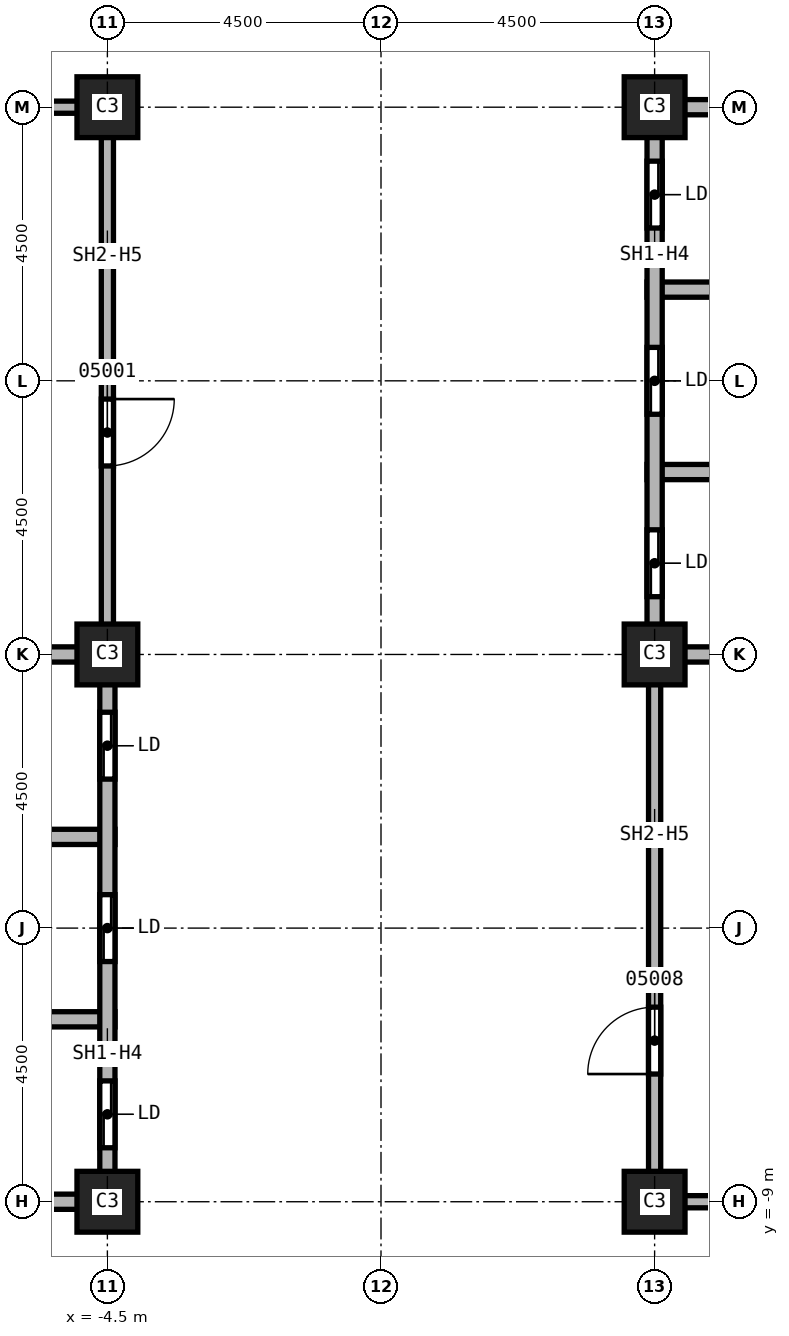
"""IFC4 building model, lengths in metres.
Left out: names, types, materials, properties, quantities, classifications, styles, units other than length and angle.
Written with IfcOpenShell. Run it as: python <this file> out.ifc"""

import sys

from ifc_helpers import new_model, si_unit, direction, frame, frame_2d, origin, origin_2d, place, context, subcontext, project, spatial, rectangle, extrude, element, fill, save


model = new_model("IFC4")
c1 = context("Model", 3, precision=1e-05, world=origin(), true_north=direction((0.0, 1.0)))
c2 = subcontext(c1, "Body", "Model", "MODEL_VIEW")
j1 = project(units=[si_unit("LENGTHUNIT", "METRE"), si_unit("PLANEANGLEUNIT", "RADIAN")], contexts=[c1])
p1 = place(None, origin())
s1 = spatial("IfcSite", under=j1, at=p1, CompositionType="ELEMENT")
p2 = place(p1, origin())
s2 = spatial("IfcBuilding", under=s1, at=p2, CompositionType="ELEMENT")
p3 = place(p2, frame((0.0, 0.0, 112.0)))
s3 = spatial("IfcBuildingStorey", under=s2, at=p3, CompositionType="ELEMENT", Elevation=112.0)
for number, where, z_axis, x_axis in (
    (1, (4.5, 0.0, 0.0), (0.0, 0.0, 1.0), (1.0, 0.0, 0.0)),
    (2, (4.5, 9.0, 0.0), (0.0, 0.0, 1.0), (1.0, 0.0, 0.0)),
    (3, (4.5, -9.0, 0.0), (0.0, 0.0, 1.0), (1.0, 0.0, 0.0)),
    (4, (-4.5, 0.0, 0.0), (0.0, 0.0, 1.0), (1.0, 0.0, 0.0)),
    (5, (-4.5, 9.0, 0.0), (0.0, 0.0, 1.0), (1.0, 0.0, 0.0)),
    (6, (-4.5, -9.0, 0.0), (0.0, 0.0, 1.0), (1.0, 0.0, 0.0)),
):
    element("IfcColumn", number, at=place(p3, frame(where, z_axis=z_axis, x_axis=x_axis)), inside=s3, PredefinedType="COLUMN", context=c2, shape_type="SweptSolid", body=[
        extrude(rectangle(XDim=1.0, YDim=1.0, at=origin_2d()), origin(), (0.0, 0.0, 1.0), 3.7),
    ])
p4 = place(p3, frame((-7.5, 9.0, 0.0), z_axis=(0.0, 0.0, 1.0), x_axis=(1.0, 0.0, 0.0)))
e7 = element("IfcWall", 7, at=p4, inside=s3, PredefinedType="SOLIDWALL", context=c2, shape_type="SweptSolid", body=[
    extrude(rectangle(XDim=3.0, YDim=0.2, at=frame_2d((1.5, 0.0))), origin(), (0.0, 0.0, 1.0), 2.938),
])
p5 = place(p3, frame((-4.5, 9.1, 0.0), z_axis=(0.0, 0.0, 1.0), x_axis=(0.0, -1.0, 0.0)))
e8 = element("IfcWall", 8, at=p5, inside=s3, PredefinedType="SOLIDWALL", context=c2, shape_type="SweptSolid", body=[
    extrude(rectangle(XDim=9.1, YDim=0.2, at=frame_2d((4.55, 0.0))), origin(), (0.0, 0.0, 1.0), 2.938),
])
p6 = place(p5, frame((4.9, 0.0, 0.0)))
e9 = element("IfcOpeningElement", 9, at=p6, cuts=e8, PredefinedType="OPENING", context=c2, shape_type="SweptSolid", body=[
    extrude(rectangle(XDim=1.1, YDim=2.1, at=frame_2d((0.55, 1.05))), frame((0.0, 0.1, 0.0), z_axis=(0.0, -1.0, 0.0), x_axis=(1.0, 0.0, 0.0)), (0.0, 0.0, 1.0), 0.2),
])
p7 = place(p3, frame((4.5, -9.1, 0.0), z_axis=(0.0, 0.0, 1.0), x_axis=(0.0, 1.0, 0.0)))
e10 = element("IfcWall", 10, at=p7, inside=s3, PredefinedType="SOLIDWALL", context=c2, shape_type="SweptSolid", body=[
    extrude(rectangle(XDim=9.1, YDim=0.2, at=frame_2d((4.55, 0.0))), origin(), (0.0, 0.0, 1.0), 2.938),
])
p8 = place(p7, frame((2.2, 0.0, 0.0)))
e11 = element("IfcOpeningElement", 11, at=p8, cuts=e10, PredefinedType="OPENING", context=c2, shape_type="SweptSolid", body=[
    extrude(rectangle(XDim=1.1, YDim=2.1, at=frame_2d((0.55, 1.05))), frame((0.0, 0.1, 0.0), z_axis=(0.0, -1.0, 0.0), x_axis=(1.0, 0.0, 0.0)), (0.0, 0.0, 1.0), 0.2),
])
p9 = place(p3, frame((7.5, -9.0, 0.0), z_axis=(0.0, 0.0, 1.0), x_axis=(-1.0, 0.0, 0.0)))
e12 = element("IfcWall", 12, at=p9, inside=s3, PredefinedType="SOLIDWALL", context=c2, shape_type="SweptSolid", body=[
    extrude(rectangle(XDim=3.0, YDim=0.2, at=frame_2d((1.5, 0.0))), origin(), (0.0, 0.0, 1.0), 2.938),
])
p10 = place(p3, frame((-13.625, -3.0, 0.0), z_axis=(0.0, 0.0, 1.0), x_axis=(1.0, 0.0, 0.0)))
e13 = element("IfcWall", 13, at=p10, inside=s3, PredefinedType="SOLIDWALL", context=c2, shape_type="SweptSolid", body=[
    extrude(rectangle(XDim=9.25, YDim=0.25, at=frame_2d((4.625, 0.0))), origin(), (0.0, 0.0, 1.0), 3.7),
])
p11 = place(p10, frame((3.25, 0.0, 0.0)))
e14 = element("IfcOpeningElement", 14, at=p11, cuts=e13, PredefinedType="OPENING", context=c2, shape_type="SweptSolid", body=[
    extrude(rectangle(XDim=1.1, YDim=2.1, at=frame_2d((0.55, 1.05))), frame((0.0, 0.125, 0.0), z_axis=(0.0, -1.0, 0.0), x_axis=(1.0, 0.0, 0.0)), (0.0, 0.0, 1.0), 0.25),
])
for number, where, z_axis, x_axis in (
    (15, (-7.625, -6.0, 0.0), (0.0, 0.0, 1.0), (1.0, 0.0, 0.0)),
    (16, (-7.625, 0.0, 0.0), (0.0, 0.0, 1.0), (1.0, 0.0, 0.0)),
):
    element("IfcWall", number, at=place(p3, frame(where, z_axis=z_axis, x_axis=x_axis)), inside=s3, PredefinedType="SOLIDWALL", context=c2, shape_type="SweptSolid", body=[
        extrude(rectangle(XDim=3.25, YDim=0.25, at=frame_2d((1.625, 0.0))), origin(), (0.0, 0.0, 1.0), 3.7),
    ])
p12 = place(p3, frame((-4.5, -9.0, 0.0), z_axis=(0.0, 0.0, 1.0), x_axis=(-1.0, 0.0, 0.0)))
e17 = element("IfcWall", 17, at=p12, inside=s3, PredefinedType="SOLIDWALL", context=c2, shape_type="SweptSolid", body=[
    extrude(rectangle(XDim=3.0, YDim=0.25, at=frame_2d((1.5, 0.0))), origin(), (0.0, 0.0, 1.0), 2.938),
])
p13 = place(p3, frame((-4.5, 0.0, 0.0), z_axis=(0.0, 0.0, 1.0), x_axis=(0.0, -1.0, 0.0)))
e18 = element("IfcWall", 18, at=p13, inside=s3, PredefinedType="SOLIDWALL", context=c2, shape_type="SweptSolid", body=[
    extrude(rectangle(XDim=9.125, YDim=0.25, at=frame_2d((4.562, 0.0))), origin(), (0.0, 0.0, 1.0), 2.938),
])
p14 = place(p13, frame((7.012, 0.0, 0.0)))
e19 = element("IfcOpeningElement", 19, at=p14, cuts=e18, PredefinedType="OPENING", context=c2, shape_type="SweptSolid", body=[
    extrude(rectangle(XDim=1.1, YDim=2.1, at=frame_2d((0.55, 1.05))), frame((0.0, 0.125, 0.0), z_axis=(0.0, -1.0, 0.0), x_axis=(1.0, 0.0, 0.0)), (0.0, 0.0, 1.0), 0.25),
])
p15 = place(p13, frame((3.95, 0.0, 0.0)))
e20 = element("IfcOpeningElement", 20, at=p15, cuts=e18, PredefinedType="OPENING", context=c2, shape_type="SweptSolid", body=[
    extrude(rectangle(XDim=1.1, YDim=2.1, at=frame_2d((0.55, 1.05))), frame((0.0, 0.125, 0.0), z_axis=(0.0, -1.0, 0.0), x_axis=(1.0, 0.0, 0.0)), (0.0, 0.0, 1.0), 0.25),
])
p16 = place(p13, frame((0.95, 0.0, 0.0)))
e21 = element("IfcOpeningElement", 21, at=p16, cuts=e18, PredefinedType="OPENING", context=c2, shape_type="SweptSolid", body=[
    extrude(rectangle(XDim=1.1, YDim=2.1, at=frame_2d((0.55, 1.05))), frame((0.0, 0.125, 0.0), z_axis=(0.0, -1.0, 0.0), x_axis=(1.0, 0.0, 0.0)), (0.0, 0.0, 1.0), 0.25),
])
p17 = place(p3, frame((4.375, 0.0, 0.0), z_axis=(0.0, 0.0, 1.0), x_axis=(1.0, 0.0, 0.0)))
e22 = element("IfcWall", 22, at=p17, inside=s3, PredefinedType="SOLIDWALL", context=c2, shape_type="SweptSolid", body=[
    extrude(rectangle(XDim=3.25, YDim=0.25, at=frame_2d((1.625, 0.0))), origin(), (0.0, 0.0, 1.0), 3.7),
])
p18 = place(p3, frame((4.375, 3.0, 0.0), z_axis=(0.0, 0.0, 1.0), x_axis=(1.0, 0.0, 0.0)))
e23 = element("IfcWall", 23, at=p18, inside=s3, PredefinedType="SOLIDWALL", context=c2, shape_type="SweptSolid", body=[
    extrude(rectangle(XDim=9.25, YDim=0.25, at=frame_2d((4.625, 0.0))), origin(), (0.0, 0.0, 1.0), 3.7),
])
p19 = place(p18, frame((4.125, 0.0, 0.0)))
e24 = element("IfcOpeningElement", 24, at=p19, cuts=e23, PredefinedType="OPENING", context=c2, shape_type="SweptSolid", body=[
    extrude(rectangle(XDim=1.1, YDim=2.1, at=frame_2d((0.55, 1.05))), frame((0.0, 0.125, 0.0), z_axis=(0.0, -1.0, 0.0), x_axis=(1.0, 0.0, 0.0)), (0.0, 0.0, 1.0), 0.25),
])
p20 = place(p3, frame((4.375, 6.0, 0.0), z_axis=(0.0, 0.0, 1.0), x_axis=(1.0, 0.0, 0.0)))
e25 = element("IfcWall", 25, at=p20, inside=s3, PredefinedType="SOLIDWALL", context=c2, shape_type="SweptSolid", body=[
    extrude(rectangle(XDim=3.25, YDim=0.25, at=frame_2d((1.625, 0.0))), origin(), (0.0, 0.0, 1.0), 3.7),
])
p21 = place(p3, frame((4.5, 0.0, 0.0), z_axis=(0.0, 0.0, 1.0), x_axis=(0.0, 1.0, 0.0)))
e26 = element("IfcWall", 26, at=p21, inside=s3, PredefinedType="SOLIDWALL", context=c2, shape_type="SweptSolid", body=[
    extrude(rectangle(XDim=9.125, YDim=0.25, at=frame_2d((4.562, 0.0))), origin(), (0.0, 0.0, 1.0), 2.938),
])
p22 = place(p21, frame((0.95, 0.0, 0.0)))
e27 = element("IfcOpeningElement", 27, at=p22, cuts=e26, PredefinedType="OPENING", context=c2, shape_type="SweptSolid", body=[
    extrude(rectangle(XDim=1.1, YDim=2.1, at=frame_2d((0.55, 1.05))), frame((0.0, 0.125, 0.0), z_axis=(0.0, -1.0, 0.0), x_axis=(1.0, 0.0, 0.0)), (0.0, 0.0, 1.0), 0.25),
])
p23 = place(p21, frame((3.95, 0.0, 0.0)))
e28 = element("IfcOpeningElement", 28, at=p23, cuts=e26, PredefinedType="OPENING", context=c2, shape_type="SweptSolid", body=[
    extrude(rectangle(XDim=1.1, YDim=2.1, at=frame_2d((0.55, 1.05))), frame((0.0, 0.125, 0.0), z_axis=(0.0, -1.0, 0.0), x_axis=(1.0, 0.0, 0.0)), (0.0, 0.0, 1.0), 0.25),
])
p24 = place(p21, frame((7.012, 0.0, 0.0)))
e29 = element("IfcOpeningElement", 29, at=p24, cuts=e26, PredefinedType="OPENING", context=c2, shape_type="SweptSolid", body=[
    extrude(rectangle(XDim=1.1, YDim=2.1, at=frame_2d((0.55, 1.05))), frame((0.0, 0.125, 0.0), z_axis=(0.0, -1.0, 0.0), x_axis=(1.0, 0.0, 0.0)), (0.0, 0.0, 1.0), 0.25),
])
p25 = place(p3, frame((4.5, 9.0, 0.0), z_axis=(0.0, 0.0, 1.0), x_axis=(1.0, 0.0, 0.0)))
e30 = element("IfcWall", 30, at=p25, inside=s3, PredefinedType="SOLIDWALL", context=c2, shape_type="SweptSolid", body=[
    extrude(rectangle(XDim=3.0, YDim=0.25, at=frame_2d((1.5, 0.0))), origin(), (0.0, 0.0, 1.0), 2.938),
])
p26 = place(p6, origin())
e31 = element("IfcDoor", 31, at=p26, inside=s3, OperationType="SINGLE_SWING_RIGHT", PredefinedType="DOOR", context=c2, shape_type="SweptSolid", body=[
    extrude(rectangle(XDim=1.1, YDim=2.1, at=frame_2d((0.55, 1.05))), frame((0.0, 0.025, 0.0), z_axis=(0.0, -1.0, 0.0), x_axis=(1.0, 0.0, 0.0)), (0.0, 0.0, 1.0), 0.05),
])
fill(e9, e31)
p27 = place(p8, origin())
e32 = element("IfcDoor", 32, at=p27, inside=s3, OperationType="SINGLE_SWING_LEFT", PredefinedType="DOOR", context=c2, shape_type="SweptSolid", body=[
    extrude(rectangle(XDim=1.1, YDim=2.1, at=frame_2d((0.55, 1.05))), frame((0.0, 0.025, 0.0), z_axis=(0.0, -1.0, 0.0), x_axis=(1.0, 0.0, 0.0)), (0.0, 0.0, 1.0), 0.05),
])
fill(e11, e32)
p28 = place(p14, origin())
e33 = element("IfcDoor", 33, at=p28, inside=s3, OperationType="SLIDING_TO_LEFT", PredefinedType="DOOR", context=c2, shape_type="SweptSolid", body=[
    extrude(rectangle(XDim=1.1, YDim=2.1, at=frame_2d((0.55, 1.05))), frame((0.0, 0.025, 0.0), z_axis=(0.0, -1.0, 0.0), x_axis=(1.0, 0.0, 0.0)), (0.0, 0.0, 1.0), 0.05),
])
fill(e19, e33)
p29 = place(p15, origin())
e34 = element("IfcDoor", 34, at=p29, inside=s3, OperationType="SLIDING_TO_LEFT", PredefinedType="DOOR", context=c2, shape_type="SweptSolid", body=[
    extrude(rectangle(XDim=1.1, YDim=2.1, at=frame_2d((0.55, 1.05))), frame((0.0, 0.025, 0.0), z_axis=(0.0, -1.0, 0.0), x_axis=(1.0, 0.0, 0.0)), (0.0, 0.0, 1.0), 0.05),
])
fill(e20, e34)
p30 = place(p16, origin())
e35 = element("IfcDoor", 35, at=p30, inside=s3, OperationType="SLIDING_TO_LEFT", PredefinedType="DOOR", context=c2, shape_type="SweptSolid", body=[
    extrude(rectangle(XDim=1.1, YDim=2.1, at=frame_2d((0.55, 1.05))), frame((0.0, 0.025, 0.0), z_axis=(0.0, -1.0, 0.0), x_axis=(1.0, 0.0, 0.0)), (0.0, 0.0, 1.0), 0.05),
])
fill(e21, e35)
p31 = place(p22, origin())
e36 = element("IfcDoor", 36, at=p31, inside=s3, OperationType="SLIDING_TO_LEFT", PredefinedType="DOOR", context=c2, shape_type="SweptSolid", body=[
    extrude(rectangle(XDim=1.1, YDim=2.1, at=frame_2d((0.55, 1.05))), frame((0.0, 0.025, 0.0), z_axis=(0.0, -1.0, 0.0), x_axis=(1.0, 0.0, 0.0)), (0.0, 0.0, 1.0), 0.05),
])
fill(e27, e36)
p32 = place(p23, origin())
e37 = element("IfcDoor", 37, at=p32, inside=s3, OperationType="SLIDING_TO_LEFT", PredefinedType="DOOR", context=c2, shape_type="SweptSolid", body=[
    extrude(rectangle(XDim=1.1, YDim=2.1, at=frame_2d((0.55, 1.05))), frame((0.0, 0.025, 0.0), z_axis=(0.0, -1.0, 0.0), x_axis=(1.0, 0.0, 0.0)), (0.0, 0.0, 1.0), 0.05),
])
fill(e28, e37)
p33 = place(p24, origin())
e38 = element("IfcDoor", 38, at=p33, inside=s3, OperationType="SLIDING_TO_LEFT", PredefinedType="DOOR", context=c2, shape_type="SweptSolid", body=[
    extrude(rectangle(XDim=1.1, YDim=2.1, at=frame_2d((0.55, 1.05))), frame((0.0, 0.025, 0.0), z_axis=(0.0, -1.0, 0.0), x_axis=(1.0, 0.0, 0.0)), (0.0, 0.0, 1.0), 0.05),
])
fill(e29, e38)
save(model, sys.argv[1])
